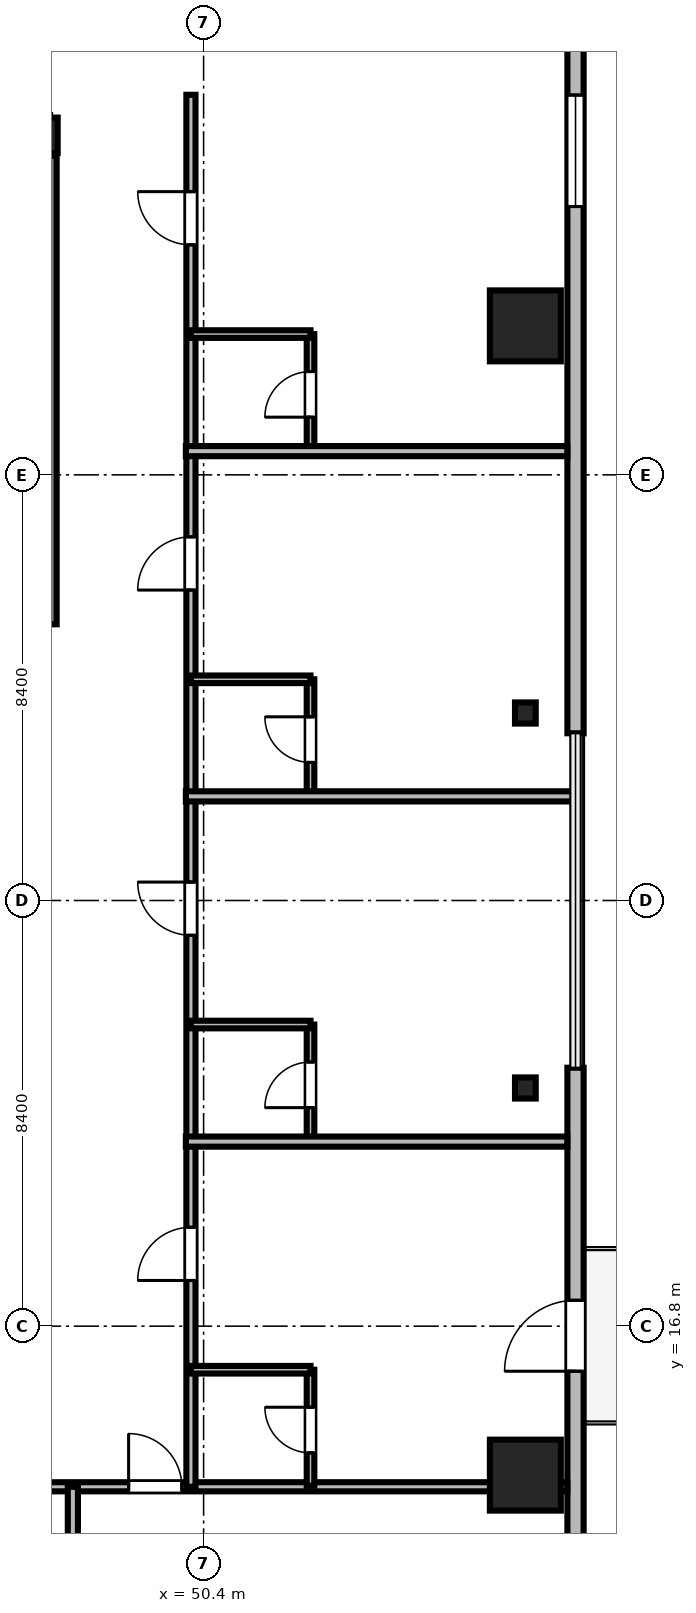
"""IFC4 building model, lengths in metres.
Left out: names, types, materials, properties, quantities, classifications, styles, units other than length and angle.
Written with IfcOpenShell. Run it as: python <this file> out.ifc"""

import sys

from ifc_helpers import new_model, si_unit, direction, frame, frame_2d, origin, origin_2d, place, context, subcontext, project, spatial, rectangle, i_section, extrude, source, transform, mapped, element, fill, save


model = new_model("IFC4")
c1 = context("Model", 3, precision=1e-05, world=origin(), true_north=direction((0.0, 1.0)))
c2 = subcontext(c1, "Body", "Model", "MODEL_VIEW")
j1 = project(units=[si_unit("LENGTHUNIT", "METRE"), si_unit("PLANEANGLEUNIT", "RADIAN")], contexts=[c1])
p1 = place(None, origin())
s1 = spatial("IfcSite", under=j1, at=p1, CompositionType="ELEMENT")
p2 = place(p1, origin())
s2 = spatial("IfcBuilding", under=s1, at=p2, CompositionType="ELEMENT")
p3 = place(p2, frame((0.0, 0.0, 199.8)))
s3 = spatial("IfcBuildingStorey", under=s2, at=p3, CompositionType="ELEMENT", Elevation=199.8)
m1 = source(origin(), c2, "Body", "SweptSolid", [
    extrude(i_section(OverallWidth=0.3, OverallDepth=0.7, WebThickness=0.017, FlangeThickness=0.032, FilletRadius=0.027, at=origin_2d()), origin(), (0.0, 0.0, 1.0), 3.53),
])
p4 = place(p3, frame((47.37, 40.3, 0.0), z_axis=(0.0, 0.0, 1.0), x_axis=(1.0, 0.0, 0.0)))
e1 = element("IfcColumn", 1, at=p4, inside=s3, PredefinedType="COLUMN", context=c2, shape_type="MappedRepresentation", body=[
    mapped(m1, transform((0.0, 0.0, 0.0), scale=1.0)),
])
m2 = source(origin(), c2, "Body", "SweptSolid", [
    extrude(rectangle(XDim=1.4, YDim=1.4, at=origin_2d()), origin(), (0.0, 0.0, 1.0), 3.53),
])
for number, where, z_axis, x_axis in (
    (2, (56.75, 13.86, 0.0), (0.0, 0.0, 1.0), (1.0, 0.0, 0.0)),
    (3, (56.75, 36.54, 0.0), (0.0, 0.0, 1.0), (1.0, 0.0, 0.0)),
):
    element("IfcColumn", number, at=place(p3, frame(where, z_axis=z_axis, x_axis=x_axis)), inside=s3, PredefinedType="COLUMN", context=c2, shape_type="MappedRepresentation", body=[
        mapped(m2, transform((0.0, 0.0, 0.0), scale=1.0)),
    ])
m3 = source(origin(), c2, "Body", "SweptSolid", [
    extrude(i_section(OverallWidth=0.409, OverallDepth=0.417, WebThickness=0.021, FlangeThickness=0.033, FilletRadius=0.015, at=origin_2d()), origin(), (0.0, 0.0, 1.0), 3.53),
])
for number, where, z_axis, x_axis in (
    (4, (56.75, 21.5, 0.0), (0.0, 0.0, 1.0), (1.0, 0.0, 0.0)),
    (5, (56.75, 28.9, 0.0), (0.0, 0.0, 1.0), (1.0, 0.0, 0.0)),
):
    element("IfcColumn", number, at=place(p3, frame(where, z_axis=z_axis, x_axis=x_axis)), inside=s3, PredefinedType="COLUMN", context=c2, shape_type="MappedRepresentation", body=[
        mapped(m3, transform((0.0, 0.0, 0.0), scale=1.0)),
    ])
m4 = source(origin(), c2, "Body", "SweptSolid", [
    extrude(rectangle(XDim=15.6, YDim=0.32, at=frame_2d((7.8, 0.0))), origin(), (0.0, 0.0, 1.0), 3.53),
])
p5 = place(p3, frame((57.74, 6.3, 0.0), z_axis=(0.0, 0.0, 1.0), x_axis=(0.0, 1.0, 0.0)))
e6 = element("IfcWall", 6, at=p5, inside=s3, PredefinedType="SOLIDWALL", context=c2, shape_type="MappedRepresentation", body=[
    mapped(m4, transform((0.0, 0.0, 0.0), scale=1.0)),
])
m5 = source(origin(), c2, "Body", "SweptSolid", [
    extrude(rectangle(XDim=1.4, YDim=2.3, at=frame_2d((0.7, 1.15))), frame((0.0, 0.17, 0.0), z_axis=(0.0, -1.0, 0.0), x_axis=(1.0, 0.0, 0.0)), (0.0, 0.0, 1.0), 0.34),
])
p6 = place(p5, frame((9.61, 0.0, 0.0)))
e7 = element("IfcOpeningElement", 7, at=p6, cuts=e6, PredefinedType="OPENING", context=c2, shape_type="MappedRepresentation", body=[
    mapped(m5, transform((0.0, 0.0, 0.0), scale=1.0)),
])
m6 = source(origin(), c2, "Body", "SweptSolid", [
    extrude(rectangle(XDim=2.2, YDim=2.4, at=frame_2d((1.1, 1.2))), frame((0.0, 0.17, 0.0), z_axis=(0.0, -1.0, 0.0), x_axis=(1.0, 0.0, 0.0)), (0.0, 0.0, 1.0), 0.34),
])
p7 = place(p5, frame((3.005, 0.0, 0.72)))
e8 = element("IfcOpeningElement", 8, at=p7, cuts=e6, PredefinedType="OPENING", context=c2, shape_type="MappedRepresentation", body=[
    mapped(m6, transform((0.0, 0.0, 0.0), scale=1.0)),
])
m7 = source(origin(), c2, "Body", "SweptSolid", [
    extrude(rectangle(XDim=15.6, YDim=0.32, at=frame_2d((7.8, 0.0))), origin(), (0.0, 0.0, 1.0), 3.53),
])
p8 = place(p3, frame((57.74, 28.5, 0.0), z_axis=(0.0, 0.0, 1.0), x_axis=(0.0, 1.0, 0.0)))
e9 = element("IfcWall", 9, at=p8, inside=s3, PredefinedType="SOLIDWALL", context=c2, shape_type="MappedRepresentation", body=[
    mapped(m7, transform((0.0, 0.0, 0.0), scale=1.0)),
])
p9 = place(p8, frame((10.395, 0.0, 0.72)))
e10 = element("IfcOpeningElement", 10, at=p9, cuts=e9, PredefinedType="OPENING", context=c2, shape_type="MappedRepresentation", body=[
    mapped(m6, transform((0.0, 0.0, 0.0), scale=1.0)),
])
m8 = source(origin(), c2, "Body", "SweptSolid", [
    extrude(rectangle(XDim=9.25, YDim=0.25, at=frame_2d((4.625, 0.0))), origin(), (0.0, 0.0, 1.0), 3.55),
])
p10 = place(p3, frame((47.375, 30.65, 0.0), z_axis=(0.0, 0.0, 1.0), x_axis=(0.0, 1.0, 0.0)))
e11 = element("IfcWall", 11, at=p10, inside=s3, PredefinedType="SOLIDWALL", context=c2, shape_type="MappedRepresentation", body=[
    mapped(m8, transform((0.0, 0.0, 0.0), scale=1.0)),
])
m9 = source(origin(), c2, "Body", "SweptSolid", [
    extrude(rectangle(XDim=46.156, YDim=0.18, at=frame_2d((23.078, 0.0))), origin(), (0.0, 0.0, 1.0), 2.772),
])
p11 = place(p3, frame((11.422, 13.63, 0.0), z_axis=(0.0, 0.0, 1.0), x_axis=(1.0, 0.0, 0.0)))
e12 = element("IfcWall", 12, at=p11, inside=s3, PredefinedType="PARTITIONING", context=c2, shape_type="MappedRepresentation", body=[
    mapped(m9, transform((0.0, 0.0, 0.0), scale=1.0)),
])
m10 = source(origin(), c2, "Body", "SweptSolid", [
    extrude(rectangle(XDim=1.05, YDim=2.2, at=frame_2d((0.525, 1.1))), frame((0.0, 0.1, 0.0), z_axis=(0.0, -1.0, 0.0), x_axis=(1.0, 0.0, 0.0)), (0.0, 0.0, 1.0), 0.2),
])
p12 = place(p11, frame((9.078, 0.0, 0.0)))
e13 = element("IfcOpeningElement", 13, at=p12, cuts=e12, PredefinedType="OPENING", context=c2, shape_type="MappedRepresentation", body=[
    mapped(m10, transform((0.0, 0.0, 0.0), scale=1.0)),
])
p13 = place(p11, frame((11.755, 0.0, 0.0)))
e14 = element("IfcOpeningElement", 14, at=p13, cuts=e12, PredefinedType="OPENING", context=c2, shape_type="MappedRepresentation", body=[
    mapped(m10, transform((0.0, 0.0, 0.0), scale=1.0)),
])
p14 = place(p11, frame((16.199, 0.0, 0.0)))
e15 = element("IfcOpeningElement", 15, at=p14, cuts=e12, PredefinedType="OPENING", context=c2, shape_type="MappedRepresentation", body=[
    mapped(m10, transform((0.0, 0.0, 0.0), scale=1.0)),
])
p15 = place(p11, frame((21.393, 0.0, 0.0)))
e16 = element("IfcOpeningElement", 16, at=p15, cuts=e12, PredefinedType="OPENING", context=c2, shape_type="MappedRepresentation", body=[
    mapped(m10, transform((0.0, 0.0, 0.0), scale=1.0)),
])
m11 = source(origin(), c2, "Body", "SweptSolid", [
    extrude(rectangle(XDim=0.95, YDim=2.15, at=frame_2d((0.475, 1.075))), frame((0.0, 0.1, 0.0), z_axis=(0.0, -1.0, 0.0), x_axis=(1.0, 0.0, 0.0)), (0.0, 0.0, 1.0), 0.2),
])
p16 = place(p11, frame((27.812, 0.0, 0.0)))
e17 = element("IfcOpeningElement", 17, at=p16, cuts=e12, PredefinedType="OPENING", context=c2, shape_type="MappedRepresentation", body=[
    mapped(m11, transform((0.0, 0.0, 0.0), scale=1.0)),
])
p17 = place(p11, frame((32.531, 0.0, 0.0)))
e18 = element("IfcOpeningElement", 18, at=p17, cuts=e12, PredefinedType="OPENING", context=c2, shape_type="MappedRepresentation", body=[
    mapped(m10, transform((0.0, 0.0, 0.0), scale=1.0)),
])
p18 = place(p11, frame((37.498, 0.0, 0.0)))
e19 = element("IfcOpeningElement", 19, at=p18, cuts=e12, PredefinedType="OPENING", context=c2, shape_type="MappedRepresentation", body=[
    mapped(m10, transform((0.0, 0.0, 0.0), scale=1.0)),
])
m12 = source(origin(), c2, "Body", "SweptSolid", [
    extrude(rectangle(XDim=27.47, YDim=0.18, at=frame_2d((13.735, 0.0))), origin(), (0.0, 0.0, 1.0), 2.972),
])
p19 = place(p3, frame((50.15, 13.63, 0.0), z_axis=(0.0, 0.0, 1.0), x_axis=(0.0, 1.0, 0.0)))
e20 = element("IfcWall", 20, at=p19, inside=s3, PredefinedType="PARTITIONING", context=c2, shape_type="MappedRepresentation", body=[
    mapped(m12, transform((0.0, 0.0, 0.0), scale=1.0)),
])
p20 = place(p19, frame((4.071, 0.0, 0.0)))
e21 = element("IfcOpeningElement", 21, at=p20, cuts=e20, PredefinedType="OPENING", context=c2, shape_type="MappedRepresentation", body=[
    mapped(m10, transform((0.0, 0.0, 0.0), scale=1.0)),
])
p21 = place(p19, frame((10.884, 0.0, 0.0)))
e22 = element("IfcOpeningElement", 22, at=p21, cuts=e20, PredefinedType="OPENING", context=c2, shape_type="MappedRepresentation", body=[
    mapped(m10, transform((0.0, 0.0, 0.0), scale=1.0)),
])
p22 = place(p19, frame((17.696, 0.0, 0.0)))
e23 = element("IfcOpeningElement", 23, at=p22, cuts=e20, PredefinedType="OPENING", context=c2, shape_type="MappedRepresentation", body=[
    mapped(m10, transform((0.0, 0.0, 0.0), scale=1.0)),
])
p23 = place(p19, frame((24.509, 0.0, 0.0)))
e24 = element("IfcOpeningElement", 24, at=p23, cuts=e20, PredefinedType="OPENING", context=c2, shape_type="MappedRepresentation", body=[
    mapped(m10, transform((0.0, 0.0, 0.0), scale=1.0)),
])
m13 = source(origin(), c2, "Body", "SweptSolid", [
    extrude(rectangle(XDim=2.29, YDim=0.15, at=frame_2d((1.145, 0.0))), origin(), (0.0, 0.0, 1.0), 2.972),
])
p24 = place(p3, frame((52.51, 13.65, 0.0), z_axis=(0.0, 0.0, 1.0), x_axis=(0.0, 1.0, 0.0)))
e25 = element("IfcWall", 25, at=p24, inside=s3, PredefinedType="PARTITIONING", context=c2, shape_type="MappedRepresentation", body=[
    mapped(m13, transform((0.0, 0.0, 0.0), scale=1.0)),
])
m14 = source(origin(), c2, "Body", "SweptSolid", [
    extrude(rectangle(XDim=0.9, YDim=2.1, at=frame_2d((0.45, 1.05))), frame((0.0, 0.085, 0.0), z_axis=(0.0, -1.0, 0.0), x_axis=(1.0, 0.0, 0.0)), (0.0, 0.0, 1.0), 0.17),
])
p25 = place(p24, frame((0.65, 0.0, 0.0)))
e26 = element("IfcOpeningElement", 26, at=p25, cuts=e25, PredefinedType="OPENING", context=c2, shape_type="MappedRepresentation", body=[
    mapped(m14, transform((0.0, 0.0, 0.0), scale=1.0)),
])
m15 = source(origin(), c2, "Body", "SweptSolid", [
    extrude(rectangle(XDim=2.29, YDim=0.15, at=frame_2d((1.145, 0.0))), origin(), (0.0, 0.0, 1.0), 3.53),
])
p26 = place(p3, frame((52.51, 20.462, 0.0), z_axis=(0.0, 0.0, 1.0), x_axis=(0.0, 1.0, 0.0)))
e27 = element("IfcWall", 27, at=p26, inside=s3, PredefinedType="PARTITIONING", context=c2, shape_type="MappedRepresentation", body=[
    mapped(m15, transform((0.0, 0.0, 0.0), scale=1.0)),
])
p27 = place(p26, frame((0.65, 0.0, 0.0)))
e28 = element("IfcOpeningElement", 28, at=p27, cuts=e27, PredefinedType="OPENING", context=c2, shape_type="MappedRepresentation", body=[
    mapped(m14, transform((0.0, 0.0, 0.0), scale=1.0)),
])
p28 = place(p3, frame((52.51, 27.275, 0.0), z_axis=(0.0, 0.0, 1.0), x_axis=(0.0, 1.0, 0.0)))
e29 = element("IfcWall", 29, at=p28, inside=s3, PredefinedType="PARTITIONING", context=c2, shape_type="MappedRepresentation", body=[
    mapped(m13, transform((0.0, 0.0, 0.0), scale=1.0)),
])
p29 = place(p28, frame((0.65, 0.0, 0.0)))
e30 = element("IfcOpeningElement", 30, at=p29, cuts=e29, PredefinedType="OPENING", context=c2, shape_type="MappedRepresentation", body=[
    mapped(m14, transform((0.0, 0.0, 0.0), scale=1.0)),
])
p30 = place(p3, frame((52.51, 34.088, 0.0), z_axis=(0.0, 0.0, 1.0), x_axis=(0.0, 1.0, 0.0)))
e31 = element("IfcWall", 31, at=p30, inside=s3, PredefinedType="PARTITIONING", context=c2, shape_type="MappedRepresentation", body=[
    mapped(m15, transform((0.0, 0.0, 0.0), scale=1.0)),
])
p31 = place(p30, frame((0.65, 0.0, 0.0)))
e32 = element("IfcOpeningElement", 32, at=p31, cuts=e31, PredefinedType="OPENING", context=c2, shape_type="MappedRepresentation", body=[
    mapped(m14, transform((0.0, 0.0, 0.0), scale=1.0)),
])
m16 = source(origin(), c2, "Body", "SweptSolid", [
    extrude(rectangle(XDim=11.508, YDim=0.2, at=frame_2d((5.754, 0.0))), origin(), (0.0, 0.0, 1.0), 2.772),
])
p32 = place(p3, frame((47.82, 2.122, 0.0), z_axis=(0.0, 0.0, 1.0), x_axis=(0.0, 1.0, 0.0)))
e33 = element("IfcWall", 33, at=p32, inside=s3, PredefinedType="PARTITIONING", context=c2, shape_type="MappedRepresentation", body=[
    mapped(m16, transform((0.0, 0.0, 0.0), scale=1.0)),
])
m17 = source(origin(), c2, "Body", "SweptSolid", [
    extrude(rectangle(XDim=7.528, YDim=0.2, at=frame_2d((3.764, 0.0))), origin(), (0.0, 0.0, 1.0), 2.772),
])
p33 = place(p3, frame((50.05, 20.442, 0.0), z_axis=(0.0, 0.0, 1.0), x_axis=(1.0, 0.0, 0.0)))
e34 = element("IfcWall", 34, at=p33, inside=s3, PredefinedType="PARTITIONING", context=c2, shape_type="MappedRepresentation", body=[
    mapped(m17, transform((0.0, 0.0, 0.0), scale=1.0)),
])
m18 = source(origin(), c2, "Body", "SweptSolid", [
    extrude(rectangle(XDim=7.72, YDim=0.2, at=frame_2d((3.86, 0.0))), origin(), (0.0, 0.0, 1.0), 2.772),
])
p34 = place(p3, frame((50.05, 27.255, 0.0), z_axis=(0.0, 0.0, 1.0), x_axis=(1.0, 0.0, 0.0)))
e35 = element("IfcWall", 35, at=p34, inside=s3, PredefinedType="PARTITIONING", context=c2, shape_type="MappedRepresentation", body=[
    mapped(m18, transform((0.0, 0.0, 0.0), scale=1.0)),
])
p35 = place(p3, frame((50.05, 34.068, 0.0), z_axis=(0.0, 0.0, 1.0), x_axis=(1.0, 0.0, 0.0)))
e36 = element("IfcWall", 36, at=p35, inside=s3, PredefinedType="PARTITIONING", context=c2, shape_type="MappedRepresentation", body=[
    mapped(m17, transform((0.0, 0.0, 0.0), scale=1.0)),
])
m19 = source(origin(), c2, "Body", "SweptSolid", [
    extrude(rectangle(XDim=2.36, YDim=0.15, at=frame_2d((1.18, 0.0))), origin(), (0.0, 0.0, 1.0), 3.53),
])
for number, where, z_axis, x_axis in (
    (37, (50.15, 15.94, 0.0), (0.0, 0.0, 1.0), (1.0, 0.0, 0.0)),
    (38, (50.15, 22.752, 0.0), (0.0, 0.0, 1.0), (1.0, 0.0, 0.0)),
    (39, (50.15, 29.565, 0.0), (0.0, 0.0, 1.0), (1.0, 0.0, 0.0)),
    (40, (50.15, 36.378, 0.0), (0.0, 0.0, 1.0), (1.0, 0.0, 0.0)),
):
    element("IfcWall", number, at=place(p3, frame(where, z_axis=z_axis, x_axis=x_axis)), inside=s3, PredefinedType="PARTITIONING", context=c2, shape_type="MappedRepresentation", body=[
        mapped(m19, transform((0.0, 0.0, 0.0), scale=1.0)),
    ])
m20 = source(origin(), c2, "Body", "SweptSolid", [
    extrude(rectangle(XDim=1.4, YDim=2.3, at=frame_2d((0.7, 1.15))), frame((0.0, 0.025, 0.0), z_axis=(0.0, -1.0, 0.0), x_axis=(1.0, 0.0, 0.0)), (0.0, 0.0, 1.0), 0.05),
])
p36 = place(p6, frame((1.4, 0.0, 0.0), z_axis=(0.0, 0.0, 1.0), x_axis=(-1.0, 0.0, 0.0)))
e41 = element("IfcDoor", 41, at=p36, inside=s3, OperationType="DOUBLE_DOOR_SLIDING", PredefinedType="DOOR", context=c2, shape_type="MappedRepresentation", body=[
    mapped(m20, transform((0.0, 0.0, 0.0), scale=1.0)),
])
fill(e7, e41)
m21 = source(origin(), c2, "Body", "SweptSolid", [
    extrude(rectangle(XDim=2.2, YDim=2.4, at=frame_2d((1.1, 1.2))), frame((0.0, 0.03, 0.0), z_axis=(0.0, -1.0, 0.0), x_axis=(1.0, 0.0, 0.0)), (0.0, 0.0, 1.0), 0.06),
])
p37 = place(p9, origin())
e42 = element("IfcWindow", 42, at=p37, inside=s3, PartitioningType="SINGLE_PANEL", PredefinedType="WINDOW", context=c2, shape_type="MappedRepresentation", body=[
    mapped(m21, transform((0.0, 0.0, 0.0), scale=1.0)),
])
fill(e10, e42)
m22 = source(origin(), c2, "Body", "SweptSolid", [
    extrude(rectangle(XDim=1.05, YDim=2.2, at=frame_2d((0.525, 1.1))), frame((0.0, 0.025, 0.0), z_axis=(0.0, -1.0, 0.0), x_axis=(1.0, 0.0, 0.0)), (0.0, 0.0, 1.0), 0.05),
])
p38 = place(p18, origin())
e43 = element("IfcDoor", 43, at=p38, inside=s3, OperationType="SINGLE_SWING_LEFT", PredefinedType="DOOR", context=c2, shape_type="MappedRepresentation", body=[
    mapped(m22, transform((0.0, 0.0, 0.0), scale=1.0)),
])
fill(e19, e43)
p39 = place(p20, origin())
e44 = element("IfcDoor", 44, at=p39, inside=s3, OperationType="SINGLE_SWING_LEFT", PredefinedType="DOOR", context=c2, shape_type="MappedRepresentation", body=[
    mapped(m22, transform((0.0, 0.0, 0.0), scale=1.0)),
])
fill(e21, e44)
p40 = place(p21, origin())
e45 = element("IfcDoor", 45, at=p40, inside=s3, OperationType="SINGLE_SWING_RIGHT", PredefinedType="DOOR", context=c2, shape_type="MappedRepresentation", body=[
    mapped(m22, transform((0.0, 0.0, 0.0), scale=1.0)),
])
fill(e22, e45)
p41 = place(p22, origin())
e46 = element("IfcDoor", 46, at=p41, inside=s3, OperationType="SINGLE_SWING_LEFT", PredefinedType="DOOR", context=c2, shape_type="MappedRepresentation", body=[
    mapped(m22, transform((0.0, 0.0, 0.0), scale=1.0)),
])
fill(e23, e46)
p42 = place(p23, origin())
e47 = element("IfcDoor", 47, at=p42, inside=s3, OperationType="SINGLE_SWING_RIGHT", PredefinedType="DOOR", context=c2, shape_type="MappedRepresentation", body=[
    mapped(m22, transform((0.0, 0.0, 0.0), scale=1.0)),
])
fill(e24, e47)
m23 = source(origin(), c2, "Body", "SweptSolid", [
    extrude(rectangle(XDim=0.9, YDim=2.1, at=frame_2d((0.45, 1.05))), frame((0.0, 0.025, 0.0), z_axis=(0.0, -1.0, 0.0), x_axis=(1.0, 0.0, 0.0)), (0.0, 0.0, 1.0), 0.05),
])
p43 = place(p25, origin())
e48 = element("IfcDoor", 48, at=p43, inside=s3, OperationType="SINGLE_SWING_RIGHT", PredefinedType="DOOR", context=c2, shape_type="MappedRepresentation", body=[
    mapped(m23, transform((0.0, 0.0, 0.0), scale=1.0)),
])
fill(e26, e48)
p44 = place(p27, origin())
e49 = element("IfcDoor", 49, at=p44, inside=s3, OperationType="SINGLE_SWING_LEFT", PredefinedType="DOOR", context=c2, shape_type="MappedRepresentation", body=[
    mapped(m23, transform((0.0, 0.0, 0.0), scale=1.0)),
])
fill(e28, e49)
p45 = place(p29, origin())
e50 = element("IfcDoor", 50, at=p45, inside=s3, OperationType="SINGLE_SWING_RIGHT", PredefinedType="DOOR", context=c2, shape_type="MappedRepresentation", body=[
    mapped(m23, transform((0.0, 0.0, 0.0), scale=1.0)),
])
fill(e30, e50)
p46 = place(p31, origin())
e51 = element("IfcDoor", 51, at=p46, inside=s3, OperationType="SINGLE_SWING_LEFT", PredefinedType="DOOR", context=c2, shape_type="MappedRepresentation", body=[
    mapped(m23, transform((0.0, 0.0, 0.0), scale=1.0)),
])
fill(e32, e51)
save(model, sys.argv[1])
